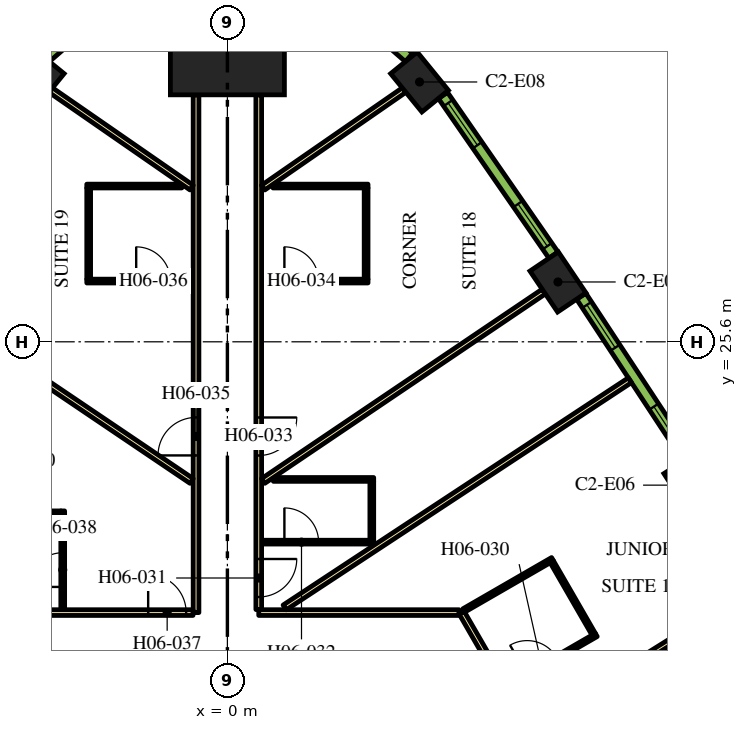
"""IFC4 building model, lengths in metres.
Left out: names, types, materials, properties, quantities, classifications, styles, units other than length and angle.
Written with IfcOpenShell. Run it as: python <this file> out.ifc"""

import sys

from ifc_helpers import new_model, si_unit, direction, frame, frame_2d, origin, origin_2d, place, context, subcontext, project, spatial, rectangle, extrude, element, fill, save


model = new_model("IFC4")
c1 = context("Model", 3, precision=1e-05, world=origin(), true_north=direction((0.0, 1.0)))
c2 = subcontext(c1, "Body", "Model", "MODEL_VIEW")
j1 = project(units=[si_unit("LENGTHUNIT", "METRE"), si_unit("PLANEANGLEUNIT", "RADIAN")], contexts=[c1])
p1 = place(None, origin())
s1 = spatial("IfcSite", under=j1, at=p1, CompositionType="ELEMENT")
p2 = place(p1, origin())
s2 = spatial("IfcBuilding", under=s1, at=p2, CompositionType="ELEMENT")
p3 = place(p2, frame((0.0, 0.0, 87.6)))
s3 = spatial("IfcBuildingStorey", under=s2, at=p3, CompositionType="ELEMENT", Elevation=87.6)
p4 = place(p3, frame((0.0, 33.598, 0.0), z_axis=(0.0, 0.0, 1.0), x_axis=(0.0, 1.0, 0.0)))
e1 = element("IfcColumn", 1, at=p4, inside=s3, PredefinedType="COLUMN", context=c2, shape_type="SweptSolid", body=[
    extrude(rectangle(XDim=3.0, YDim=3.0, at=origin_2d()), origin(), (0.0, 0.0, 1.0), 3.9),
])
for number, where, z_axis, x_axis in (
    (2, (12.217, 21.828, 0.0), (0.0, 0.0, 1.0), (-0.54, 0.842, 0.0)),
    (3, (8.699, 27.174, 0.0), (0.0, 0.0, 1.0), (-0.559, 0.829, 0.0)),
    (4, (5.056, 32.437, 0.0), (0.0, 0.0, 1.0), (-0.632, 0.775, 0.0)),
    (5, (-5.056, 32.437, 0.0), (0.0, 0.0, 1.0), (-0.632, -0.775, 0.0)),
):
    element("IfcColumn", number, at=place(p3, frame(where, z_axis=z_axis, x_axis=x_axis)), inside=s3, PredefinedType="COLUMN", context=c2, shape_type="SweptSolid", body=[
        extrude(rectangle(XDim=1.3, YDim=0.9, at=origin_2d()), origin(), (0.0, 0.0, 1.0), 3.9),
    ])
p5 = place(p3, frame((6.163, 18.475, 0.0), z_axis=(0.0, 0.0, 1.0), x_axis=(0.500001317485, -0.866024643133, 0.0)))
e6 = element("IfcWall", 6, at=p5, inside=s3, PredefinedType="PARTITIONING", context=c2, shape_type="SweptSolid", body=[
    extrude(rectangle(XDim=25.767, YDim=0.15, at=frame_2d((12.883, 0.0))), origin(), (0.0, 0.0, 1.0), 2.75),
])
p6 = place(p5, frame((24.241, 0.0, 0.0)))
e7 = element("IfcOpeningElement", 7, at=p6, cuts=e6, PredefinedType="OPENING", context=c2, shape_type="SweptSolid", body=[
    extrude(rectangle(XDim=1.0, YDim=2.1, at=frame_2d((0.5, 1.05))), frame((0.0, 0.085, 0.0), z_axis=(0.0, -1.0, 0.0), x_axis=(1.0, 0.0, 0.0)), (0.0, 0.0, 1.0), 0.17),
])
p7 = place(p5, frame((13.144, 0.0, 0.0)))
e8 = element("IfcOpeningElement", 8, at=p7, cuts=e6, PredefinedType="OPENING", context=c2, shape_type="SweptSolid", body=[
    extrude(rectangle(XDim=1.0, YDim=2.1, at=frame_2d((0.5, 1.05))), frame((0.0, 0.085, 0.0), z_axis=(0.0, -1.0, 0.0), x_axis=(1.0, 0.0, 0.0)), (0.0, 0.0, 1.0), 0.17),
])
p8 = place(p5, frame((10.874, 0.0, 0.0)))
e9 = element("IfcOpeningElement", 9, at=p8, cuts=e6, PredefinedType="OPENING", context=c2, shape_type="SweptSolid", body=[
    extrude(rectangle(XDim=0.9, YDim=2.1, at=frame_2d((0.45, 1.05))), frame((0.0, 0.085, 0.0), z_axis=(0.0, -1.0, 0.0), x_axis=(1.0, 0.0, 0.0)), (0.0, 0.0, 1.0), 0.17),
])
p9 = place(p5, frame((3.718, 0.0, 0.0)))
e10 = element("IfcOpeningElement", 10, at=p9, cuts=e6, PredefinedType="OPENING", context=c2, shape_type="SweptSolid", body=[
    extrude(rectangle(XDim=1.1, YDim=2.1, at=frame_2d((0.55, 1.05))), frame((0.0, 0.085, 0.0), z_axis=(0.0, -1.0, 0.0), x_axis=(1.0, 0.0, 0.0)), (0.0, 0.0, 1.0), 0.17),
])
p10 = place(p5, frame((2.411, 0.0, 0.0)))
e11 = element("IfcOpeningElement", 11, at=p10, cuts=e6, PredefinedType="OPENING", context=c2, shape_type="SweptSolid", body=[
    extrude(rectangle(XDim=1.0, YDim=2.1, at=frame_2d((0.5, 1.05))), frame((0.0, 0.085, 0.0), z_axis=(0.0, -1.0, 0.0), x_axis=(1.0, 0.0, 0.0)), (0.0, 0.0, 1.0), 0.17),
])
p11 = place(p3, frame((0.825, 18.475, 0.0), z_axis=(0.0, 0.0, 1.0), x_axis=(1.0, 0.0, 0.0)))
e12 = element("IfcWall", 12, at=p11, inside=s3, PredefinedType="PARTITIONING", context=c2, shape_type="SweptSolid", body=[
    extrude(rectangle(XDim=5.268, YDim=0.15, at=frame_2d((2.634, 0.0))), origin(), (0.0, 0.0, 1.0), 2.75),
])
p12 = place(p3, frame((0.825, 32.098, 0.0), z_axis=(0.0, 0.0, 1.0), x_axis=(0.0, -1.0, 0.0)))
e13 = element("IfcWall", 13, at=p12, inside=s3, PredefinedType="PARTITIONING", context=c2, shape_type="SweptSolid", body=[
    extrude(rectangle(XDim=13.543, YDim=0.15, at=frame_2d((6.772, 0.0))), origin(), (0.0, 0.0, 1.0), 2.75),
])
p13 = place(p12, frame((12.213, 0.0, 0.0)))
e14 = element("IfcOpeningElement", 14, at=p13, cuts=e13, PredefinedType="OPENING", context=c2, shape_type="SweptSolid", body=[
    extrude(rectangle(XDim=1.0, YDim=2.1, at=frame_2d((0.5, 1.05))), frame((0.0, 0.085, 0.0), z_axis=(0.0, -1.0, 0.0), x_axis=(1.0, 0.0, 0.0)), (0.0, 0.0, 1.0), 0.17),
])
p14 = place(p12, frame((8.49, 0.0, 0.0)))
e15 = element("IfcOpeningElement", 15, at=p14, cuts=e13, PredefinedType="OPENING", context=c2, shape_type="SweptSolid", body=[
    extrude(rectangle(XDim=1.0, YDim=2.1, at=frame_2d((0.5, 1.05))), frame((0.0, 0.085, 0.0), z_axis=(0.0, -1.0, 0.0), x_axis=(1.0, 0.0, 0.0)), (0.0, 0.0, 1.0), 0.17),
])
p15 = place(p3, frame((-0.825, 18.475, 0.0), z_axis=(0.0, 0.0, 1.0), x_axis=(0.0, 1.0, 0.0)))
e16 = element("IfcWall", 16, at=p15, inside=s3, PredefinedType="PARTITIONING", context=c2, shape_type="SweptSolid", body=[
    extrude(rectangle(XDim=13.623, YDim=0.15, at=frame_2d((6.812, 0.0))), origin(), (0.0, 0.0, 1.0), 2.75),
])
p16 = place(p15, frame((4.135, 0.0, 0.0)))
e17 = element("IfcOpeningElement", 17, at=p16, cuts=e16, PredefinedType="OPENING", context=c2, shape_type="SweptSolid", body=[
    extrude(rectangle(XDim=1.0, YDim=2.1, at=frame_2d((0.5, 1.05))), frame((0.0, 0.085, 0.0), z_axis=(0.0, -1.0, 0.0), x_axis=(1.0, 0.0, 0.0)), (0.0, 0.0, 1.0), 0.17),
])
p17 = place(p3, frame((-6.163, 18.475, 0.0), z_axis=(0.0, 0.0, 1.0), x_axis=(1.0, 0.0, 0.0)))
e18 = element("IfcWall", 18, at=p17, inside=s3, PredefinedType="PARTITIONING", context=c2, shape_type="SweptSolid", body=[
    extrude(rectangle(XDim=5.258, YDim=0.15, at=frame_2d((2.629, 0.0))), origin(), (0.0, 0.0, 1.0), 2.75),
])
p18 = place(p17, frame((4.078, 0.0, 0.0)))
e19 = element("IfcOpeningElement", 19, at=p18, cuts=e18, PredefinedType="OPENING", context=c2, shape_type="SweptSolid", body=[
    extrude(rectangle(XDim=1.0, YDim=2.1, at=frame_2d((0.5, 1.05))), frame((0.0, 0.085, 0.0), z_axis=(0.0, -1.0, 0.0), x_axis=(1.0, 0.0, 0.0)), (0.0, 0.0, 1.0), 0.17),
])
p19 = place(p3, frame((-8.326, 26.923, 0.0), z_axis=(0.0, 0.0, 1.0), x_axis=(0.828836601893, -0.5594907393, 0.0)))
e20 = element("IfcWall", 20, at=p19, inside=s3, PredefinedType="PARTITIONING", context=c2, shape_type="SweptSolid", body=[
    extrude(rectangle(XDim=8.909, YDim=0.15, at=frame_2d((4.455, 0.0))), origin(), (0.0, 0.0, 1.0), 2.75),
])
p20 = place(p3, frame((-4.649, 32.223, 0.0), z_axis=(0.0, 0.0, 1.0), x_axis=(0.822262349475, -0.569108626394, 0.0)))
e21 = element("IfcWall", 21, at=p20, inside=s3, PredefinedType="PARTITIONING", context=c2, shape_type="SweptSolid", body=[
    extrude(rectangle(XDim=4.51, YDim=0.15, at=frame_2d((2.255, 0.0))), origin(), (0.0, 0.0, 1.0), 2.75),
])
p21 = place(p3, frame((8.326, 26.923, 0.0), z_axis=(0.0, 0.0, 1.0), x_axis=(-0.828836601893, -0.5594907393, 0.0)))
e22 = element("IfcWall", 22, at=p21, inside=s3, PredefinedType="PARTITIONING", context=c2, shape_type="SweptSolid", body=[
    extrude(rectangle(XDim=8.909, YDim=0.15, at=frame_2d((4.455, 0.0))), origin(), (0.0, 0.0, 1.0), 2.75),
])
p22 = place(p3, frame((10.592, 24.589, 0.0), z_axis=(0.0, 0.0, 1.0), x_axis=(-0.835337323748, -0.549737715236, 0.0)))
e23 = element("IfcWall", 23, at=p22, inside=s3, PredefinedType="PARTITIONING", context=c2, shape_type="SweptSolid", body=[
    extrude(rectangle(XDim=10.875, YDim=0.15, at=frame_2d((5.438, 0.0))), origin(), (0.0, 0.0, 1.0), 2.75),
])
p23 = place(p3, frame((4.649, 32.223, 0.0), z_axis=(0.0, 0.0, 1.0), x_axis=(-0.822262349475, -0.569108626394, 0.0)))
e24 = element("IfcWall", 24, at=p23, inside=s3, PredefinedType="PARTITIONING", context=c2, shape_type="SweptSolid", body=[
    extrude(rectangle(XDim=4.51, YDim=0.15, at=frame_2d((2.255, 0.0))), origin(), (0.0, 0.0, 1.0), 2.75),
])
p24 = place(p3, frame((14.049, 19.2, 0.0), z_axis=(0.0, 0.0, 1.0), x_axis=(-0.847955867271, -0.530066832731, 0.0)))
e25 = element("IfcWall", 25, at=p24, inside=s3, PredefinedType="PARTITIONING", context=c2, shape_type="SweptSolid", body=[
    extrude(rectangle(XDim=7.111, YDim=0.15, at=frame_2d((3.556, 0.0))), origin(), (0.0, 0.0, 1.0), 2.75),
])
p25 = place(p3, frame((7.368, 16.538, 0.0), z_axis=(0.0, 0.0, 1.0), x_axis=(0.866036505625, 0.499980770555, 0.0)))
e26 = element("IfcWall", 26, at=p25, inside=s3, PredefinedType="PARTITIONING", context=c2, shape_type="SweptSolid", body=[
    extrude(rectangle(XDim=2.7, YDim=0.1, at=frame_2d((1.35, 0.0))), origin(), (0.0, 0.0, 1.0), 2.75),
])
p26 = place(p25, frame((0.6, 0.0, 0.0)))
e27 = element("IfcOpeningElement", 27, at=p26, cuts=e26, PredefinedType="OPENING", context=c2, shape_type="SweptSolid", body=[
    extrude(rectangle(XDim=0.9, YDim=2.1, at=frame_2d((0.45, 1.05))), frame((0.0, 0.06, 0.0), z_axis=(0.0, -1.0, 0.0), x_axis=(1.0, 0.0, 0.0)), (0.0, 0.0, 1.0), 0.12),
])
p27 = place(p3, frame((9.638, 17.906, 0.0), z_axis=(0.0, 0.0, 1.0), x_axis=(-0.50002983664, 0.866008176907, 0.0)))
e28 = element("IfcWall", 28, at=p27, inside=s3, PredefinedType="PARTITIONING", context=c2, shape_type="SweptSolid", body=[
    extrude(rectangle(XDim=2.2, YDim=0.1, at=frame_2d((1.1, 0.0))), origin(), (0.0, 0.0, 1.0), 2.75),
])
p28 = place(p3, frame((6.218, 18.53, 0.0), z_axis=(0.0, 0.0, 1.0), x_axis=(0.86599734893, 0.500048589285, 0.0)))
e29 = element("IfcWall", 29, at=p28, inside=s3, PredefinedType="PARTITIONING", context=c2, shape_type="SweptSolid", body=[
    extrude(rectangle(XDim=2.7, YDim=0.1, at=frame_2d((1.35, 0.0))), origin(), (0.0, 0.0, 1.0), 2.75),
])
p29 = place(p3, frame((0.9, 20.329, 0.0), z_axis=(0.0, 0.0, 1.0), x_axis=(1.0, 0.0, 0.0)))
e30 = element("IfcWall", 30, at=p29, inside=s3, PredefinedType="PARTITIONING", context=c2, shape_type="SweptSolid", body=[
    extrude(rectangle(XDim=2.95, YDim=0.1, at=frame_2d((1.475, 0.0))), origin(), (0.0, 0.0, 1.0), 2.75),
])
p30 = place(p29, frame((0.6, 0.0, 0.0)))
e31 = element("IfcOpeningElement", 31, at=p30, cuts=e30, PredefinedType="OPENING", context=c2, shape_type="SweptSolid", body=[
    extrude(rectangle(XDim=0.9, YDim=2.1, at=frame_2d((0.45, 1.05))), frame((0.0, 0.06, 0.0), z_axis=(0.0, -1.0, 0.0), x_axis=(1.0, 0.0, 0.0)), (0.0, 0.0, 1.0), 0.12),
])
p31 = place(p3, frame((3.8, 20.378, 0.0), z_axis=(0.0, 0.0, 1.0), x_axis=(0.0, 1.0, 0.0)))
e32 = element("IfcWall", 32, at=p31, inside=s3, PredefinedType="PARTITIONING", context=c2, shape_type="SweptSolid", body=[
    extrude(rectangle(XDim=1.55, YDim=0.1, at=frame_2d((0.775, 0.0))), origin(), (0.0, 0.0, 1.0), 2.75),
])
p32 = place(p3, frame((1.21, 21.979, 0.0), z_axis=(0.0, 0.0, 1.0), x_axis=(1.0, 0.0, 0.0)))
e33 = element("IfcWall", 33, at=p32, inside=s3, PredefinedType="PARTITIONING", context=c2, shape_type="SweptSolid", body=[
    extrude(rectangle(XDim=2.64, YDim=0.1, at=frame_2d((1.32, 0.0))), origin(), (0.0, 0.0, 1.0), 2.75),
])
p33 = place(p3, frame((0.9, 27.198, 0.0), z_axis=(0.0, 0.0, 1.0), x_axis=(1.0, 0.0, 0.0)))
e34 = element("IfcWall", 34, at=p33, inside=s3, PredefinedType="PARTITIONING", context=c2, shape_type="SweptSolid", body=[
    extrude(rectangle(XDim=2.8, YDim=0.1, at=frame_2d((1.4, 0.0))), origin(), (0.0, 0.0, 1.0), 2.75),
])
p34 = place(p33, frame((0.6, 0.0, 0.0)))
e35 = element("IfcOpeningElement", 35, at=p34, cuts=e34, PredefinedType="OPENING", context=c2, shape_type="SweptSolid", body=[
    extrude(rectangle(XDim=0.9, YDim=2.1, at=frame_2d((0.45, 1.05))), frame((0.0, 0.06, 0.0), z_axis=(0.0, -1.0, 0.0), x_axis=(1.0, 0.0, 0.0)), (0.0, 0.0, 1.0), 0.12),
])
p35 = place(p3, frame((3.65, 27.248, 0.0), z_axis=(0.0, 0.0, 1.0), x_axis=(0.0, 1.0, 0.0)))
e36 = element("IfcWall", 36, at=p35, inside=s3, PredefinedType="PARTITIONING", context=c2, shape_type="SweptSolid", body=[
    extrude(rectangle(XDim=2.4, YDim=0.1, at=frame_2d((1.2, 0.0))), origin(), (0.0, 0.0, 1.0), 2.75),
])
p36 = place(p3, frame((1.2, 29.698, 0.0), z_axis=(0.0, 0.0, 1.0), x_axis=(1.0, 0.0, 0.0)))
e37 = element("IfcWall", 37, at=p36, inside=s3, PredefinedType="PARTITIONING", context=c2, shape_type="SweptSolid", body=[
    extrude(rectangle(XDim=2.5, YDim=0.1, at=frame_2d((1.25, 0.0))), origin(), (0.0, 0.0, 1.0), 2.75),
])
p37 = place(p3, frame((-3.7, 27.198, 0.0), z_axis=(0.0, 0.0, 1.0), x_axis=(1.0, 0.0, 0.0)))
e38 = element("IfcWall", 38, at=p37, inside=s3, PredefinedType="PARTITIONING", context=c2, shape_type="SweptSolid", body=[
    extrude(rectangle(XDim=2.8, YDim=0.1, at=frame_2d((1.4, 0.0))), origin(), (0.0, 0.0, 1.0), 2.75),
])
p38 = place(p37, frame((1.3, 0.0, 0.0)))
e39 = element("IfcOpeningElement", 39, at=p38, cuts=e38, PredefinedType="OPENING", context=c2, shape_type="SweptSolid", body=[
    extrude(rectangle(XDim=0.9, YDim=2.1, at=frame_2d((0.45, 1.05))), frame((0.0, 0.06, 0.0), z_axis=(0.0, -1.0, 0.0), x_axis=(1.0, 0.0, 0.0)), (0.0, 0.0, 1.0), 0.12),
])
p39 = place(p3, frame((-3.65, 27.248, 0.0), z_axis=(0.0, 0.0, 1.0), x_axis=(0.0, 1.0, 0.0)))
e40 = element("IfcWall", 40, at=p39, inside=s3, PredefinedType="PARTITIONING", context=c2, shape_type="SweptSolid", body=[
    extrude(rectangle(XDim=2.4, YDim=0.1, at=frame_2d((1.2, 0.0))), origin(), (0.0, 0.0, 1.0), 2.75),
])
p40 = place(p3, frame((-1.2, 29.698, 0.0), z_axis=(0.0, 0.0, 1.0), x_axis=(-1.0, 0.0, 0.0)))
e41 = element("IfcWall", 41, at=p40, inside=s3, PredefinedType="PARTITIONING", context=c2, shape_type="SweptSolid", body=[
    extrude(rectangle(XDim=2.5, YDim=0.1, at=frame_2d((1.25, 0.0))), origin(), (0.0, 0.0, 1.0), 2.75),
])
p41 = place(p3, frame((-4.333, 18.55, 0.0), z_axis=(0.0, 0.0, 1.0), x_axis=(0.0, 1.0, 0.0)))
e42 = element("IfcWall", 42, at=p41, inside=s3, PredefinedType="PARTITIONING", context=c2, shape_type="SweptSolid", body=[
    extrude(rectangle(XDim=2.6, YDim=0.1, at=frame_2d((1.3, 0.0))), origin(), (0.0, 0.0, 1.0), 2.75),
])
p42 = place(p41, frame((0.6, 0.0, 0.0)))
e43 = element("IfcOpeningElement", 43, at=p42, cuts=e42, PredefinedType="OPENING", context=c2, shape_type="SweptSolid", body=[
    extrude(rectangle(XDim=0.9, YDim=2.1, at=frame_2d((0.45, 1.05))), frame((0.0, 0.06, 0.0), z_axis=(0.0, -1.0, 0.0), x_axis=(1.0, 0.0, 0.0)), (0.0, 0.0, 1.0), 0.12),
])
p43 = place(p3, frame((-4.383, 21.1, 0.0), z_axis=(0.0, 0.0, 1.0), x_axis=(-1.0, 0.0, 0.0)))
e44 = element("IfcWall", 44, at=p43, inside=s3, PredefinedType="PARTITIONING", context=c2, shape_type="SweptSolid", body=[
    extrude(rectangle(XDim=1.75, YDim=0.1, at=frame_2d((0.875, 0.0))), origin(), (0.0, 0.0, 1.0), 2.75),
])
p44 = place(p3, frame((12.115, 22.539, 0.0), z_axis=(0.0, 0.0, 1.0), x_axis=(-0.549741341923, 0.835334937005, 0.0)))
e45 = element("IfcWall", 45, at=p44, inside=s3, PredefinedType="SOLIDWALL", context=c2, shape_type="SweptSolid", body=[
    extrude(rectangle(XDim=5.1, YDim=0.29, at=frame_2d((2.55, 0.0))), origin(), (0.0, 0.0, 1.0), 3.65),
])
p45 = place(p44, frame((0.273, 0.0, 0.9)))
e46 = element("IfcOpeningElement", 46, at=p45, cuts=e45, PredefinedType="OPENING", context=c2, shape_type="SweptSolid", body=[
    extrude(rectangle(XDim=1.35, YDim=2.15, at=frame_2d((0.675, 1.075))), frame((0.0, 0.155, 0.0), z_axis=(0.0, -1.0, 0.0), x_axis=(1.0, 0.0, 0.0)), (0.0, 0.0, 1.0), 0.31),
])
p46 = place(p44, frame((3.478, 0.0, 0.9)))
e47 = element("IfcOpeningElement", 47, at=p46, cuts=e45, PredefinedType="OPENING", context=c2, shape_type="SweptSolid", body=[
    extrude(rectangle(XDim=1.35, YDim=2.15, at=frame_2d((0.675, 1.075))), frame((0.0, 0.155, 0.0), z_axis=(0.0, -1.0, 0.0), x_axis=(1.0, 0.0, 0.0)), (0.0, 0.0, 1.0), 0.31),
])
p47 = place(p3, frame((8.58, 27.882, 0.0), z_axis=(0.0, 0.0, 1.0), x_axis=(-0.569113019126, 0.822259309136, 0.0)))
e48 = element("IfcWall", 48, at=p47, inside=s3, PredefinedType="SOLIDWALL", context=c2, shape_type="SweptSolid", body=[
    extrude(rectangle(XDim=5.107, YDim=0.29, at=frame_2d((2.553, 0.0))), origin(), (0.0, 0.0, 1.0), 3.65),
])
p48 = place(p47, frame((0.285, 0.0, 0.9)))
e49 = element("IfcOpeningElement", 49, at=p48, cuts=e48, PredefinedType="OPENING", context=c2, shape_type="SweptSolid", body=[
    extrude(rectangle(XDim=1.35, YDim=2.15, at=frame_2d((0.675, 1.075))), frame((0.0, 0.155, 0.0), z_axis=(0.0, -1.0, 0.0), x_axis=(1.0, 0.0, 0.0)), (0.0, 0.0, 1.0), 0.31),
])
p49 = place(p47, frame((3.516, 0.0, 0.9)))
e50 = element("IfcOpeningElement", 50, at=p49, cuts=e48, PredefinedType="OPENING", context=c2, shape_type="SweptSolid", body=[
    extrude(rectangle(XDim=1.35, YDim=2.15, at=frame_2d((0.675, 1.075))), frame((0.0, 0.155, 0.0), z_axis=(0.0, -1.0, 0.0), x_axis=(1.0, 0.0, 0.0)), (0.0, 0.0, 1.0), 0.31),
])
p50 = place(p3, frame((4.778, 33.082, 0.0), z_axis=(0.0, 0.0, 1.0), x_axis=(-0.754882764627, 0.655859749999, 0.0)))
e51 = element("IfcWall", 51, at=p50, inside=s3, PredefinedType="SOLIDWALL", context=c2, shape_type="SweptSolid", body=[
    extrude(rectangle(XDim=1.82, YDim=0.29, at=frame_2d((0.91, 0.0))), origin(), (0.0, 0.0, 1.0), 3.65),
])
p51 = place(p50, frame((0.46, 0.0, 0.9)))
e52 = element("IfcOpeningElement", 52, at=p51, cuts=e51, PredefinedType="OPENING", context=c2, shape_type="SweptSolid", body=[
    extrude(rectangle(XDim=0.9, YDim=2.15, at=frame_2d((0.45, 1.075))), frame((0.0, 0.155, 0.0), z_axis=(0.0, -1.0, 0.0), x_axis=(1.0, 0.0, 0.0)), (0.0, 0.0, 1.0), 0.31),
])
p52 = place(p3, frame((-3.405, 34.275, 0.0), z_axis=(0.0, 0.0, 1.0), x_axis=(-0.754882764627, -0.655859749999, 0.0)))
e53 = element("IfcWall", 53, at=p52, inside=s3, PredefinedType="SOLIDWALL", context=c2, shape_type="SweptSolid", body=[
    extrude(rectangle(XDim=1.82, YDim=0.29, at=frame_2d((0.91, 0.0))), origin(), (0.0, 0.0, 1.0), 3.65),
])
p53 = place(p52, frame((0.46, 0.0, 0.9)))
e54 = element("IfcOpeningElement", 54, at=p53, cuts=e53, PredefinedType="OPENING", context=c2, shape_type="SweptSolid", body=[
    extrude(rectangle(XDim=0.9, YDim=2.15, at=frame_2d((0.45, 1.075))), frame((0.0, 0.155, 0.0), z_axis=(0.0, -1.0, 0.0), x_axis=(1.0, 0.0, 0.0)), (0.0, 0.0, 1.0), 0.31),
])
p54 = place(p13, origin())
e55 = element("IfcDoor", 55, at=p54, inside=s3, OperationType="SINGLE_SWING_RIGHT", PredefinedType="DOOR", context=c2, shape_type="SweptSolid", body=[
    extrude(rectangle(XDim=1.0, YDim=2.1, at=frame_2d((0.5, 1.05))), frame((0.0, 0.025, 0.0), z_axis=(0.0, -1.0, 0.0), x_axis=(1.0, 0.0, 0.0)), (0.0, 0.0, 1.0), 0.05),
])
fill(e14, e55)
p55 = place(p30, origin())
e56 = element("IfcDoor", 56, at=p55, inside=s3, OperationType="SINGLE_SWING_LEFT", PredefinedType="DOOR", context=c2, shape_type="SweptSolid", body=[
    extrude(rectangle(XDim=0.9, YDim=2.1, at=frame_2d((0.45, 1.05))), frame((0.0, 0.025, 0.0), z_axis=(0.0, -1.0, 0.0), x_axis=(1.0, 0.0, 0.0)), (0.0, 0.0, 1.0), 0.05),
])
fill(e31, e56)
p56 = place(p14, origin())
e57 = element("IfcDoor", 57, at=p56, inside=s3, OperationType="SINGLE_SWING_RIGHT", PredefinedType="DOOR", context=c2, shape_type="SweptSolid", body=[
    extrude(rectangle(XDim=1.0, YDim=2.1, at=frame_2d((0.5, 1.05))), frame((0.0, 0.025, 0.0), z_axis=(0.0, -1.0, 0.0), x_axis=(1.0, 0.0, 0.0)), (0.0, 0.0, 1.0), 0.05),
])
fill(e15, e57)
p57 = place(p34, origin())
e58 = element("IfcDoor", 58, at=p57, inside=s3, OperationType="SINGLE_SWING_RIGHT", PredefinedType="DOOR", context=c2, shape_type="SweptSolid", body=[
    extrude(rectangle(XDim=0.9, YDim=2.1, at=frame_2d((0.45, 1.05))), frame((0.0, 0.025, 0.0), z_axis=(0.0, -1.0, 0.0), x_axis=(1.0, 0.0, 0.0)), (0.0, 0.0, 1.0), 0.05),
])
fill(e35, e58)
p58 = place(p16, origin())
e59 = element("IfcDoor", 59, at=p58, inside=s3, OperationType="SINGLE_SWING_LEFT", PredefinedType="DOOR", context=c2, shape_type="SweptSolid", body=[
    extrude(rectangle(XDim=1.0, YDim=2.1, at=frame_2d((0.5, 1.05))), frame((0.0, 0.025, 0.0), z_axis=(0.0, -1.0, 0.0), x_axis=(1.0, 0.0, 0.0)), (0.0, 0.0, 1.0), 0.05),
])
fill(e17, e59)
p59 = place(p38, origin())
e60 = element("IfcDoor", 60, at=p59, inside=s3, OperationType="SINGLE_SWING_LEFT", PredefinedType="DOOR", context=c2, shape_type="SweptSolid", body=[
    extrude(rectangle(XDim=0.9, YDim=2.1, at=frame_2d((0.45, 1.05))), frame((0.0, 0.025, 0.0), z_axis=(0.0, -1.0, 0.0), x_axis=(1.0, 0.0, 0.0)), (0.0, 0.0, 1.0), 0.05),
])
fill(e39, e60)
p60 = place(p18, origin())
e61 = element("IfcDoor", 61, at=p60, inside=s3, OperationType="SINGLE_SWING_RIGHT", PredefinedType="DOOR", context=c2, shape_type="SweptSolid", body=[
    extrude(rectangle(XDim=1.0, YDim=2.1, at=frame_2d((0.5, 1.05))), frame((0.0, 0.025, 0.0), z_axis=(0.0, -1.0, 0.0), x_axis=(1.0, 0.0, 0.0)), (0.0, 0.0, 1.0), 0.05),
])
fill(e19, e61)
p61 = place(p42, origin())
e62 = element("IfcDoor", 62, at=p61, inside=s3, OperationType="SINGLE_SWING_LEFT", PredefinedType="DOOR", context=c2, shape_type="SweptSolid", body=[
    extrude(rectangle(XDim=0.9, YDim=2.1, at=frame_2d((0.45, 1.05))), frame((0.0, 0.025, 0.0), z_axis=(0.0, -1.0, 0.0), x_axis=(1.0, 0.0, 0.0)), (0.0, 0.0, 1.0), 0.05),
])
fill(e43, e62)
p62 = place(p45, origin())
e63 = element("IfcWindow", 63, at=p62, inside=s3, PartitioningType="DOUBLE_PANEL_VERTICAL", PredefinedType="WINDOW", context=c2, shape_type="SweptSolid", body=[
    extrude(rectangle(XDim=1.35, YDim=2.15, at=frame_2d((0.675, 1.075))), frame((0.0, 0.015, 0.0), z_axis=(0.0, -1.0, 0.0), x_axis=(1.0, 0.0, 0.0)), (0.0, 0.0, 1.0), 0.06),
])
fill(e46, e63)
p63 = place(p46, origin())
e64 = element("IfcWindow", 64, at=p63, inside=s3, PartitioningType="DOUBLE_PANEL_VERTICAL", PredefinedType="WINDOW", context=c2, shape_type="SweptSolid", body=[
    extrude(rectangle(XDim=1.35, YDim=2.15, at=frame_2d((0.675, 1.075))), frame((0.0, 0.015, 0.0), z_axis=(0.0, -1.0, 0.0), x_axis=(1.0, 0.0, 0.0)), (0.0, 0.0, 1.0), 0.06),
])
fill(e47, e64)
p64 = place(p48, origin())
e65 = element("IfcWindow", 65, at=p64, inside=s3, PartitioningType="DOUBLE_PANEL_VERTICAL", PredefinedType="WINDOW", context=c2, shape_type="SweptSolid", body=[
    extrude(rectangle(XDim=1.35, YDim=2.15, at=frame_2d((0.675, 1.075))), frame((0.0, 0.015, 0.0), z_axis=(0.0, -1.0, 0.0), x_axis=(1.0, 0.0, 0.0)), (0.0, 0.0, 1.0), 0.06),
])
fill(e49, e65)
p65 = place(p49, origin())
e66 = element("IfcWindow", 66, at=p65, inside=s3, PartitioningType="DOUBLE_PANEL_VERTICAL", PredefinedType="WINDOW", context=c2, shape_type="SweptSolid", body=[
    extrude(rectangle(XDim=1.35, YDim=2.15, at=frame_2d((0.675, 1.075))), frame((0.0, 0.015, 0.0), z_axis=(0.0, -1.0, 0.0), x_axis=(1.0, 0.0, 0.0)), (0.0, 0.0, 1.0), 0.06),
])
fill(e50, e66)
save(model, sys.argv[1])
